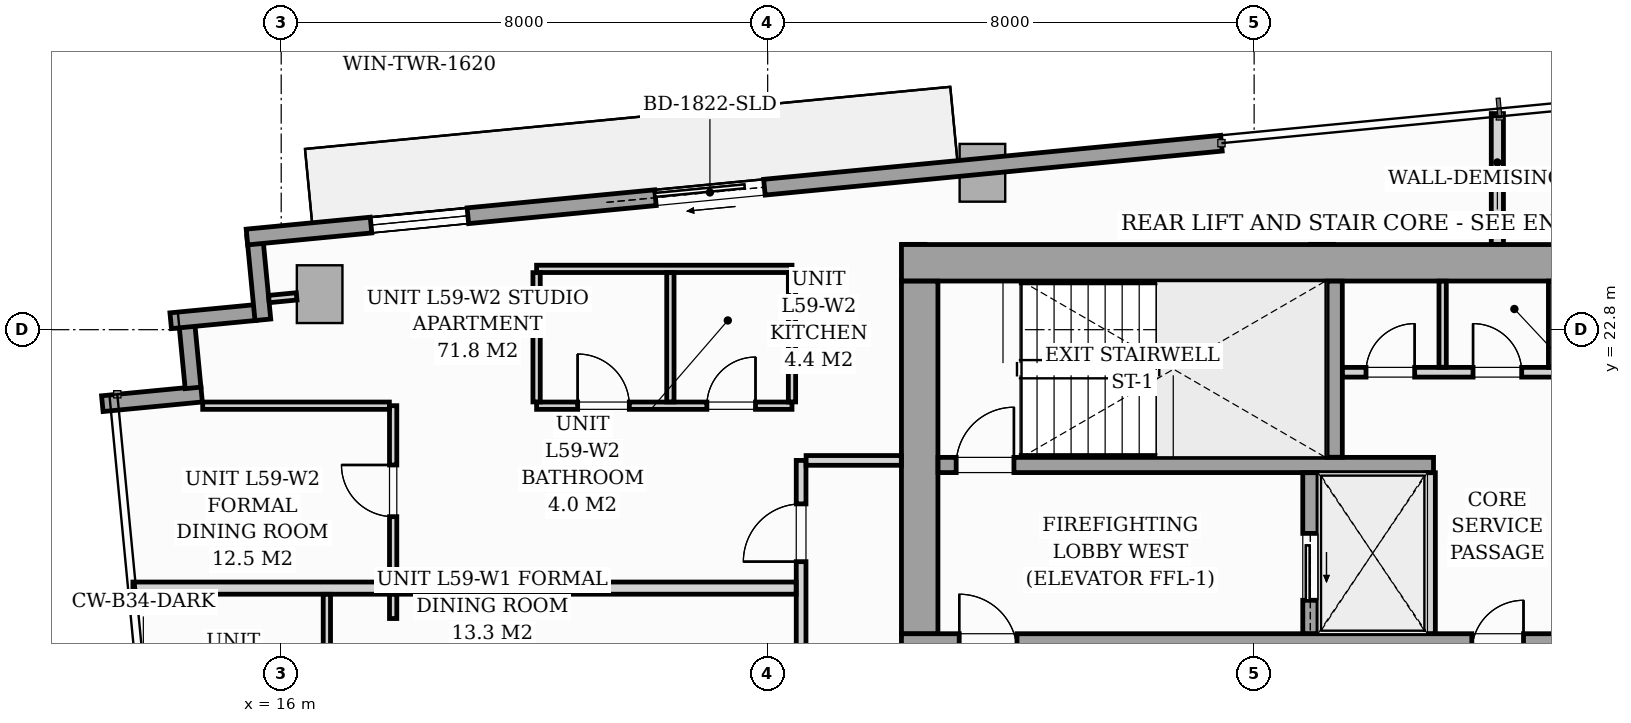
"""IFC4 building model, lengths in metres.
Left out: names, types, materials, properties, quantities, classifications, styles, units other than length and angle.
Written with IfcOpenShell. Run it as: python <this file> out.ifc"""

import sys

from ifc_helpers import new_model, si_unit, direction, frame, frame_2d, origin, origin_2d, place, context, subcontext, project, spatial, rectangle, i_section, extrude, source, transform, mapped, element, fill, save


model = new_model("IFC4")
c1 = context("Model", 3, precision=1e-05, world=origin(), true_north=direction((0.0, 1.0)))
c2 = subcontext(c1, "Body", "Model", "MODEL_VIEW")
j1 = project(units=[si_unit("LENGTHUNIT", "METRE"), si_unit("PLANEANGLEUNIT", "RADIAN")], contexts=[c1])
p1 = place(None, origin())
s1 = spatial("IfcSite", under=j1, at=p1, CompositionType="ELEMENT")
p2 = place(p1, origin())
s2 = spatial("IfcBuilding", under=s1, at=p2, CompositionType="ELEMENT")
p3 = place(p2, frame((0.0, 0.0, 205.0)))
s3 = spatial("IfcBuildingStorey", under=s2, at=p3, CompositionType="ELEMENT", Elevation=205.0)
m1 = source(origin(), c2, "Body", "SweptSolid", [
    extrude(i_section(OverallWidth=0.416, OverallDepth=0.446, WebThickness=0.039, FlangeThickness=0.063, FilletRadius=0.018, at=origin_2d()), origin(), (0.0, 0.0, 1.0), 3.196),
])
for number, where, z_axis, x_axis in (
    (1, (26.4, 24.0, 0.002), (0.0, 0.0, 1.0), (1.0, 0.0, 0.0)),
    (2, (33.12, 24.0, 0.002), (0.0, 0.0, 1.0), (1.0, 0.0, 0.0)),
):
    element("IfcColumn", number, at=place(p3, frame(where, z_axis=z_axis, x_axis=x_axis)), inside=s3, PredefinedType="PILASTER", context=c2, shape_type="MappedRepresentation", body=[
        mapped(m1, transform((0.0, 0.0, 0.0), scale=1.0)),
    ])
m2 = source(origin(), c2, "Body", "SweptSolid", [
    extrude(rectangle(XDim=0.75, YDim=0.95, at=origin_2d()), origin(), (0.0, 0.0, 1.0), 3.196),
])
for number, where, z_axis, x_axis in (
    (3, (16.632, 23.384, 0.002), (0.0, 0.0, 1.0), (0.995, 0.096, 0.0)),
    (4, (27.532, 25.38, 0.002), (0.0, 0.0, 1.0), (0.995, 0.096, 0.0)),
):
    element("IfcColumn", number, at=place(p3, frame(where, z_axis=z_axis, x_axis=x_axis)), inside=s3, PredefinedType="COLUMN", context=c2, shape_type="MappedRepresentation", body=[
        mapped(m2, transform((0.0, 0.0, 0.0), scale=1.0)),
    ])
p4 = place(p3, frame((13.058, 21.583, 0.0), z_axis=(0.0, 0.0, 1.0), x_axis=(0.995394563142, 0.095862733462, 0.0)))
e5 = element("IfcWall", 5, at=p4, inside=s3, PredefinedType="STANDARD", context=c2, shape_type="SweptSolid", body=[
    extrude(rectangle(XDim=1.64, YDim=0.26, at=frame_2d((0.82, 0.0))), origin(), (0.0, 0.0, 1.0), 2.94),
])
p5 = place(p3, frame((14.55, 21.843, 0.0), z_axis=(0.0, 0.0, 1.0), x_axis=(-0.09576095695, 0.995404359607, 0.0)))
e6 = element("IfcWall", 6, at=p5, inside=s3, PredefinedType="STANDARD", context=c2, shape_type="SweptSolid", body=[
    extrude(rectangle(XDim=1.15, YDim=0.26, at=frame_2d((0.575, 0.0))), origin(), (0.0, 0.0, 1.0), 2.94),
])
p6 = place(p3, frame((14.183, 22.947, 0.0), z_axis=(0.0, 0.0, 1.0), x_axis=(0.99540614245, 0.095742423056, 0.0)))
e7 = element("IfcWall", 7, at=p6, inside=s3, PredefinedType="STANDARD", context=c2, shape_type="SweptSolid", body=[
    extrude(rectangle(XDim=1.395, YDim=0.26, at=frame_2d((0.697, 0.0))), origin(), (0.0, 0.0, 1.0), 2.94),
])
p7 = place(p3, frame((15.698, 22.963, 0.0), z_axis=(0.0, 0.0, 1.0), x_axis=(-0.09589913835, 0.995391056452, 0.0)))
e8 = element("IfcWall", 8, at=p7, inside=s3, PredefinedType="STANDARD", context=c2, shape_type="SweptSolid", body=[
    extrude(rectangle(XDim=1.395, YDim=0.26, at=frame_2d((0.698, 0.0))), origin(), (0.0, 0.0, 1.0), 2.94),
])
p8 = place(p3, frame((15.437, 24.324, 0.0), z_axis=(0.0, 0.0, 1.0), x_axis=(0.995395627913, 0.095851676732, 0.0)))
e9 = element("IfcWall", 9, at=p8, inside=s3, PredefinedType="STANDARD", context=c2, shape_type="SweptSolid", body=[
    extrude(rectangle(XDim=16.1, YDim=0.26, at=frame_2d((8.05, 0.0))), origin(), (0.0, 0.0, 1.0), 2.94),
])
p9 = place(p8, frame((6.749, 0.0, 0.0)))
e10 = element("IfcOpeningElement", 10, at=p9, cuts=e9, PredefinedType="OPENING", context=c2, shape_type="SweptSolid", body=[
    extrude(rectangle(XDim=1.8, YDim=2.06, at=frame_2d((0.9, 1.03))), frame((0.0, 0.14, 0.0), z_axis=(0.0, -1.0, 0.0), x_axis=(1.0, 0.0, 0.0)), (0.0, 0.0, 1.0), 0.28),
])
p10 = place(p8, frame((2.05, 0.0, 0.65)))
e11 = element("IfcOpeningElement", 11, at=p10, cuts=e9, PredefinedType="OPENING", context=c2, shape_type="SweptSolid", body=[
    extrude(rectangle(XDim=1.6, YDim=1.5, at=frame_2d((0.8, 0.75))), frame((0.0, 0.14, 0.0), z_axis=(0.0, -1.0, 0.0), x_axis=(1.0, 0.0, 0.0)), (0.0, 0.0, 1.0), 0.28),
])
p11 = place(p3, frame((26.2, 17.5, 0.0), z_axis=(0.0, 0.0, 1.0), x_axis=(1.0, 0.0, 0.0)))
e12 = element("IfcWall", 12, at=p11, inside=s3, PredefinedType="SHEAR", context=c2, shape_type="SweptSolid", body=[
    extrude(rectangle(XDim=19.6, YDim=0.6, at=frame_2d((9.8, 0.0))), origin(), (0.0, 0.0, 1.0), 3.2),
])
p12 = place(p11, frame((0.95, 0.0, 0.0)))
e13 = element("IfcOpeningElement", 13, at=p12, cuts=e12, PredefinedType="OPENING", context=c2, shape_type="SweptSolid", body=[
    extrude(rectangle(XDim=0.95, YDim=2.06, at=frame_2d((0.475, 1.03))), frame((0.0, 0.31, 0.0), z_axis=(0.0, -1.0, 0.0), x_axis=(1.0, 0.0, 0.0)), (0.0, 0.0, 1.0), 0.62),
])
p13 = place(p11, frame((9.38, 0.0, 0.0)))
e14 = element("IfcOpeningElement", 14, at=p13, cuts=e12, PredefinedType="OPENING", context=c2, shape_type="SweptSolid", body=[
    extrude(rectangle(XDim=0.85, YDim=2.0, at=frame_2d((0.425, 1.0))), frame((0.0, 0.31, 0.0), z_axis=(0.0, -1.0, 0.0), x_axis=(1.0, 0.0, 0.0)), (0.0, 0.0, 1.0), 0.62),
])
p14 = place(p11, frame((17.55, 0.0, 0.0)))
e15 = element("IfcOpeningElement", 15, at=p14, cuts=e12, PredefinedType="OPENING", context=c2, shape_type="SweptSolid", body=[
    extrude(rectangle(XDim=0.95, YDim=2.06, at=frame_2d((0.475, 1.03))), frame((0.0, 0.31, 0.0), z_axis=(0.0, -1.0, 0.0), x_axis=(1.0, 0.0, 0.0)), (0.0, 0.0, 1.0), 0.62),
])
p15 = place(p3, frame((26.2, 23.9, 0.0), z_axis=(0.0, 0.0, 1.0), x_axis=(1.0, 0.0, 0.0)))
e16 = element("IfcWall", 16, at=p15, inside=s3, PredefinedType="SHEAR", context=c2, shape_type="SweptSolid", body=[
    extrude(rectangle(XDim=19.6, YDim=0.6, at=frame_2d((9.8, 0.0))), origin(), (0.0, 0.0, 1.0), 3.2),
])
p16 = place(p3, frame((26.5, 17.802, 0.0), z_axis=(0.0, 0.0, 1.0), x_axis=(0.0, 1.0, 0.0)))
e17 = element("IfcWall", 17, at=p16, inside=s3, PredefinedType="SHEAR", context=c2, shape_type="SweptSolid", body=[
    extrude(rectangle(XDim=5.796, YDim=0.6, at=frame_2d((2.898, 0.0))), origin(), (0.0, 0.0, 1.0), 3.2),
])
p17 = place(p3, frame((26.802, 20.575, 0.0), z_axis=(0.0, 0.0, 1.0), x_axis=(1.0, 0.0, 0.0)))
e18 = element("IfcWall", 18, at=p17, inside=s3, PredefinedType="SOLIDWALL", context=c2, shape_type="SweptSolid", body=[
    extrude(rectangle(XDim=8.148, YDim=0.25, at=frame_2d((4.074, 0.0))), origin(), (0.0, 0.0, 1.0), 3.2),
])
p18 = place(p17, frame((0.298, 0.0, 0.0)))
e19 = element("IfcOpeningElement", 19, at=p18, cuts=e18, PredefinedType="OPENING", context=c2, shape_type="SweptSolid", body=[
    extrude(rectangle(XDim=0.95, YDim=2.06, at=frame_2d((0.475, 1.03))), frame((0.0, 0.135, 0.0), z_axis=(0.0, -1.0, 0.0), x_axis=(1.0, 0.0, 0.0)), (0.0, 0.0, 1.0), 0.27),
])
p19 = place(p3, frame((33.325, 20.702, 0.0), z_axis=(0.0, 0.0, 1.0), x_axis=(0.0, 1.0, 0.0)))
e20 = element("IfcWall", 20, at=p19, inside=s3, PredefinedType="SOLIDWALL", context=c2, shape_type="SweptSolid", body=[
    extrude(rectangle(XDim=2.896, YDim=0.25, at=frame_2d((1.448, 0.0))), origin(), (0.0, 0.0, 1.0), 3.2),
])
p20 = place(p3, frame((32.925, 17.802, 0.0), z_axis=(0.0, 0.0, 1.0), x_axis=(0.0, 1.0, 0.0)))
e21 = element("IfcWall", 21, at=p20, inside=s3, PredefinedType="SOLIDWALL", context=c2, shape_type="SweptSolid", body=[
    extrude(rectangle(XDim=2.646, YDim=0.25, at=frame_2d((1.323, 0.0))), origin(), (0.0, 0.0, 1.0), 3.2),
])
p21 = place(p20, frame((0.548, 0.0, 0.0)))
e22 = element("IfcOpeningElement", 22, at=p21, cuts=e21, PredefinedType="OPENING", context=c2, shape_type="SweptSolid", body=[
    extrude(rectangle(XDim=1.1, YDim=2.08, at=frame_2d((0.55, 1.04))), frame((0.0, 0.135, 0.0), z_axis=(0.0, -1.0, 0.0), x_axis=(1.0, 0.0, 0.0)), (0.0, 0.0, 1.0), 0.27),
])
p22 = place(p3, frame((34.9, 17.802, 0.0), z_axis=(0.0, 0.0, 1.0), x_axis=(0.0, 1.0, 0.0)))
e23 = element("IfcWall", 23, at=p22, inside=s3, PredefinedType="PARTITIONING", context=c2, shape_type="SweptSolid", body=[
    extrude(rectangle(XDim=2.646, YDim=0.16, at=frame_2d((1.323, 0.0))), origin(), (0.0, 0.0, 1.0), 2.94),
])
p23 = place(p3, frame((33.452, 22.1, 0.0), z_axis=(0.0, 0.0, 1.0), x_axis=(1.0, 0.0, 0.0)))
e24 = element("IfcWall", 24, at=p23, inside=s3, PredefinedType="PARTITIONING", context=c2, shape_type="SweptSolid", body=[
    extrude(rectangle(XDim=5.096, YDim=0.16, at=frame_2d((2.548, 0.0))), origin(), (0.0, 0.0, 1.0), 2.94),
])
p24 = place(p23, frame((0.388, 0.0, 0.0)))
e25 = element("IfcOpeningElement", 25, at=p24, cuts=e24, PredefinedType="OPENING", context=c2, shape_type="SweptSolid", body=[
    extrude(rectangle(XDim=0.8, YDim=2.05, at=frame_2d((0.4, 1.025))), frame((0.0, 0.09, 0.0), z_axis=(0.0, -1.0, 0.0), x_axis=(1.0, 0.0, 0.0)), (0.0, 0.0, 1.0), 0.18),
])
p25 = place(p23, frame((2.148, 0.0, 0.0)))
e26 = element("IfcOpeningElement", 26, at=p25, cuts=e24, PredefinedType="OPENING", context=c2, shape_type="SweptSolid", body=[
    extrude(rectangle(XDim=0.8, YDim=2.05, at=frame_2d((0.4, 1.025))), frame((0.0, 0.09, 0.0), z_axis=(0.0, -1.0, 0.0), x_axis=(1.0, 0.0, 0.0)), (0.0, 0.0, 1.0), 0.18),
])
p26 = place(p23, frame((3.908, 0.0, 0.0)))
e27 = element("IfcOpeningElement", 27, at=p26, cuts=e24, PredefinedType="OPENING", context=c2, shape_type="SweptSolid", body=[
    extrude(rectangle(XDim=0.8, YDim=2.05, at=frame_2d((0.4, 1.025))), frame((0.0, 0.09, 0.0), z_axis=(0.0, -1.0, 0.0), x_axis=(1.0, 0.0, 0.0)), (0.0, 0.0, 1.0), 0.18),
])
for number, where, z_axis, x_axis in (
    (28, (35.1, 22.182, 0.0), (0.0, 0.0, 1.0), (0.0, 1.0, 0.0)),
    (29, (36.9, 22.182, 0.0), (0.0, 0.0, 1.0), (0.0, 1.0, 0.0)),
):
    element("IfcWall", number, at=place(p3, frame(where, z_axis=z_axis, x_axis=x_axis)), inside=s3, PredefinedType="PARTITIONING", context=c2, shape_type="SweptSolid", body=[
        extrude(rectangle(XDim=1.416, YDim=0.12, at=frame_2d((0.708, 0.0))), origin(), (0.0, 0.0, 1.0), 2.94),
    ])
p27 = place(p3, frame((24.55, 13.362, 0.0), z_axis=(0.0, 0.0, 1.0), x_axis=(0.0, 1.0, 0.0)))
e30 = element("IfcWall", 30, at=p27, inside=s3, PredefinedType="PARTITIONING", context=c2, shape_type="SweptSolid", body=[
    extrude(rectangle(XDim=7.288, YDim=0.16, at=frame_2d((3.644, 0.0))), origin(), (0.0, 0.0, 1.0), 2.94),
])
p28 = place(p27, frame((0.493, 0.0, 0.0)))
e31 = element("IfcOpeningElement", 31, at=p28, cuts=e30, PredefinedType="OPENING", context=c2, shape_type="SweptSolid", body=[
    extrude(rectangle(XDim=0.95, YDim=2.06, at=frame_2d((0.475, 1.03))), frame((0.0, 0.09, 0.0), z_axis=(0.0, -1.0, 0.0), x_axis=(1.0, 0.0, 0.0)), (0.0, 0.0, 1.0), 0.18),
])
p29 = place(p27, frame((5.623, 0.0, 0.0)))
e32 = element("IfcOpeningElement", 32, at=p29, cuts=e30, PredefinedType="OPENING", context=c2, shape_type="SweptSolid", body=[
    extrude(rectangle(XDim=0.95, YDim=2.06, at=frame_2d((0.475, 1.03))), frame((0.0, 0.09, 0.0), z_axis=(0.0, -1.0, 0.0), x_axis=(1.0, 0.0, 0.0)), (0.0, 0.0, 1.0), 0.18),
])
p30 = place(p3, frame((36.0, 24.202, 0.0), z_axis=(0.0, 0.0, 1.0), x_axis=(0.0, 1.0, 0.0)))
e33 = element("IfcWall", 33, at=p30, inside=s3, PredefinedType="PARTITIONING", context=c2, shape_type="SweptSolid", body=[
    extrude(rectangle(XDim=2.152, YDim=0.2, at=frame_2d((1.076, 0.0))), origin(), (0.0, 0.0, 1.0), 2.94),
])
p31 = place(p3, frame((24.632, 20.65, 0.0), z_axis=(0.0, 0.0, 1.0), x_axis=(1.0, 0.0, 0.0)))
e34 = element("IfcWall", 34, at=p31, inside=s3, PredefinedType="PARTITIONING", context=c2, shape_type="SweptSolid", body=[
    extrude(rectangle(XDim=1.566, YDim=0.16, at=frame_2d((0.783, 0.0))), origin(), (0.0, 0.0, 1.0), 2.94),
])
p32 = place(p3, frame((13.561, 18.55, 0.0), z_axis=(0.0, 0.0, 1.0), x_axis=(1.0, 0.0, 0.0)))
e35 = element("IfcWall", 35, at=p32, inside=s3, PredefinedType="PARTITIONING", context=c2, shape_type="SweptSolid", body=[
    extrude(rectangle(XDim=10.907, YDim=0.2, at=frame_2d((5.453, 0.0))), origin(), (0.0, 0.0, 1.0), 2.94),
])
p33 = place(p3, frame((16.751, 7.615, 0.0), z_axis=(0.0, 0.0, 1.0), x_axis=(0.0, 1.0, 0.0)))
e36 = element("IfcWall", 36, at=p33, inside=s3, PredefinedType="PARTITIONING", context=c2, shape_type="SweptSolid", body=[
    extrude(rectangle(XDim=10.833, YDim=0.12, at=frame_2d((5.417, 0.0))), origin(), (0.0, 0.0, 1.0), 2.94),
])
p34 = place(p33, frame((4.849, 0.0, 0.0)))
e37 = element("IfcOpeningElement", 37, at=p34, cuts=e36, PredefinedType="OPENING", context=c2, shape_type="SweptSolid", body=[
    extrude(rectangle(XDim=0.85, YDim=2.05, at=frame_2d((0.425, 1.025))), frame((0.0, 0.07, 0.0), z_axis=(0.0, -1.0, 0.0), x_axis=(1.0, 0.0, 0.0)), (0.0, 0.0, 1.0), 0.14),
])
p35 = place(p3, frame((20.2, 21.55, 0.0), z_axis=(0.0, 0.0, 1.0), x_axis=(1.0, 0.0, 0.0)))
e38 = element("IfcWall", 38, at=p35, inside=s3, PredefinedType="PARTITIONING", context=c2, shape_type="SweptSolid", body=[
    extrude(rectangle(XDim=4.2, YDim=0.12, at=frame_2d((2.1, 0.0))), origin(), (0.0, 0.0, 1.0), 2.94),
])
p36 = place(p35, frame((0.675, 0.0, 0.0)))
e39 = element("IfcOpeningElement", 39, at=p36, cuts=e38, PredefinedType="OPENING", context=c2, shape_type="SweptSolid", body=[
    extrude(rectangle(XDim=0.85, YDim=2.05, at=frame_2d((0.425, 1.025))), frame((0.0, 0.07, 0.0), z_axis=(0.0, -1.0, 0.0), x_axis=(1.0, 0.0, 0.0)), (0.0, 0.0, 1.0), 0.14),
])
p37 = place(p35, frame((2.8, 0.0, 0.0)))
e40 = element("IfcOpeningElement", 40, at=p37, cuts=e38, PredefinedType="OPENING", context=c2, shape_type="SweptSolid", body=[
    extrude(rectangle(XDim=0.8, YDim=2.02, at=frame_2d((0.4, 1.01))), frame((0.0, 0.07, 0.0), z_axis=(0.0, -1.0, 0.0), x_axis=(1.0, 0.0, 0.0)), (0.0, 0.0, 1.0), 0.14),
])
p38 = place(p3, frame((20.2, 23.8, 0.0), z_axis=(0.0, 0.0, 1.0), x_axis=(1.0, 0.0, 0.0)))
e41 = element("IfcWall", 41, at=p38, inside=s3, PredefinedType="PARTITIONING", context=c2, shape_type="SweptSolid", body=[
    extrude(rectangle(XDim=4.2, YDim=0.12, at=frame_2d((2.1, 0.0))), origin(), (0.0, 0.0, 1.0), 2.3),
])
for number, where, z_axis, x_axis in (
    (42, (20.2, 21.612, 0.0), (0.0, 0.0, 1.0), (0.0, 1.0, 0.0)),
    (43, (22.4, 21.612, 0.0), (0.0, 0.0, 1.0), (0.0, 1.0, 0.0)),
    (44, (24.4, 21.612, 0.0), (0.0, 0.0, 1.0), (0.0, 1.0, 0.0)),
):
    element("IfcWall", number, at=place(p3, frame(where, z_axis=z_axis, x_axis=x_axis)), inside=s3, PredefinedType="PARTITIONING", context=c2, shape_type="SweptSolid", body=[
        extrude(rectangle(XDim=2.126, YDim=0.12, at=frame_2d((1.063, 0.0))), origin(), (0.0, 0.0, 1.0), 2.94),
    ])
p39 = place(p3, frame((17.841, 18.05, 0.0), z_axis=(0.0, 0.0, 1.0), x_axis=(0.0, 1.0, 0.0)))
e45 = element("IfcWall", 45, at=p39, inside=s3, PredefinedType="PARTITIONING", context=c2, shape_type="SweptSolid", body=[
    extrude(rectangle(XDim=0.398, YDim=0.12, at=frame_2d((0.199, 0.0))), origin(), (0.0, 0.0, 1.0), 2.94),
])
p40 = place(p3, frame((17.841, 18.652, 0.0), z_axis=(0.0, 0.0, 1.0), x_axis=(0.0, 1.0, 0.0)))
e46 = element("IfcWall", 46, at=p40, inside=s3, PredefinedType="PARTITIONING", context=c2, shape_type="SweptSolid", body=[
    extrude(rectangle(XDim=2.898, YDim=0.12, at=frame_2d((1.449, 0.0))), origin(), (0.0, 0.0, 1.0), 2.94),
])
p41 = place(p40, frame((1.073, 0.0, 0.0)))
e47 = element("IfcOpeningElement", 47, at=p41, cuts=e46, PredefinedType="OPENING", context=c2, shape_type="SweptSolid", body=[
    extrude(rectangle(XDim=0.85, YDim=2.05, at=frame_2d((0.425, 1.025))), frame((0.0, 0.07, 0.0), z_axis=(0.0, -1.0, 0.0), x_axis=(1.0, 0.0, 0.0)), (0.0, 0.0, 1.0), 0.14),
])
p42 = place(p3, frame((14.709, 21.55, 0.0), z_axis=(0.0, 0.0, 1.0), x_axis=(1.0, 0.0, 0.0)))
e48 = element("IfcWall", 48, at=p42, inside=s3, PredefinedType="PARTITIONING", context=c2, shape_type="SweptSolid", body=[
    extrude(rectangle(XDim=3.07, YDim=0.12, at=frame_2d((1.535, 0.0))), origin(), (0.0, 0.0, 1.0), 2.94),
])
p43 = place(p3, frame((16.254, 23.348, 0.0), z_axis=(0.0, 0.0, 1.0), x_axis=(-0.995384576284, -0.09596637586, 0.0)))
e49 = element("IfcWall", 49, at=p43, inside=s3, PredefinedType="PARTITIONING", context=c2, shape_type="SweptSolid", body=[
    extrude(rectangle(XDim=0.458, YDim=0.12, at=frame_2d((0.229, 0.0))), origin(), (0.0, 0.0, 1.0), 2.94),
])
m3 = source(origin(), c2, "Body", "SweptSolid", [
    extrude(rectangle(XDim=1.8, YDim=2.06, at=frame_2d((0.9, 1.03))), frame((0.0, 0.025, 0.0), z_axis=(0.0, -1.0, 0.0), x_axis=(1.0, 0.0, 0.0)), (0.0, 0.0, 1.0), 0.05),
])
p44 = place(p9, origin())
e50 = element("IfcDoor", 50, at=p44, inside=s3, OperationType="SLIDING_TO_LEFT", PredefinedType="DOOR", context=c2, shape_type="MappedRepresentation", body=[
    mapped(m3, transform((0.0, 0.0, 0.0), scale=1.0)),
])
fill(e10, e50)
m4 = source(origin(), c2, "Body", "SweptSolid", [
    extrude(rectangle(XDim=1.6, YDim=1.5, at=frame_2d((0.8, 0.75))), frame((0.0, 0.03, 0.0), z_axis=(0.0, -1.0, 0.0), x_axis=(1.0, 0.0, 0.0)), (0.0, 0.0, 1.0), 0.06),
])
p45 = place(p10, origin())
e51 = element("IfcWindow", 51, at=p45, inside=s3, PartitioningType="SINGLE_PANEL", PredefinedType="WINDOW", context=c2, shape_type="MappedRepresentation", body=[
    mapped(m4, transform((0.0, 0.0, 0.0), scale=1.0)),
])
fill(e11, e51)
m5 = source(origin(), c2, "Body", "SweptSolid", [
    extrude(rectangle(XDim=0.95, YDim=2.06, at=frame_2d((0.475, 1.03))), frame((0.0, 0.025, 0.0), z_axis=(0.0, -1.0, 0.0), x_axis=(1.0, 0.0, 0.0)), (0.0, 0.0, 1.0), 0.05),
])
p46 = place(p18, origin())
e52 = element("IfcDoor", 52, at=p46, inside=s3, OperationType="SINGLE_SWING_RIGHT", PredefinedType="DOOR", context=c2, shape_type="MappedRepresentation", body=[
    mapped(m5, transform((0.0, 0.0, 0.0), scale=1.0)),
])
fill(e19, e52)
m6 = source(origin(), c2, "Body", "SweptSolid", [
    extrude(rectangle(XDim=1.1, YDim=2.08, at=frame_2d((0.55, 1.04))), frame((0.0, 0.025, 0.0), z_axis=(0.0, -1.0, 0.0), x_axis=(1.0, 0.0, 0.0)), (0.0, 0.0, 1.0), 0.05),
])
p47 = place(p21, origin())
e53 = element("IfcDoor", 53, at=p47, inside=s3, OperationType="SLIDING_TO_LEFT", PredefinedType="DOOR", context=c2, shape_type="MappedRepresentation", body=[
    mapped(m6, transform((0.0, 0.0, 0.0), scale=1.0)),
])
fill(e22, e53)
m7 = source(origin(), c2, "Body", "SweptSolid", [
    extrude(rectangle(XDim=0.8, YDim=2.05, at=frame_2d((0.4, 1.025))), frame((0.0, 0.025, 0.0), z_axis=(0.0, -1.0, 0.0), x_axis=(1.0, 0.0, 0.0)), (0.0, 0.0, 1.0), 0.05),
])
p48 = place(p24, origin())
e54 = element("IfcDoor", 54, at=p48, inside=s3, OperationType="SINGLE_SWING_RIGHT", PredefinedType="DOOR", context=c2, shape_type="MappedRepresentation", body=[
    mapped(m7, transform((0.0, 0.0, 0.0), scale=1.0)),
])
fill(e25, e54)
p49 = place(p25, origin())
e55 = element("IfcDoor", 55, at=p49, inside=s3, OperationType="SINGLE_SWING_LEFT", PredefinedType="DOOR", context=c2, shape_type="MappedRepresentation", body=[
    mapped(m7, transform((0.0, 0.0, 0.0), scale=1.0)),
])
fill(e26, e55)
m8 = source(origin(), c2, "Body", "SweptSolid", [
    extrude(rectangle(XDim=0.95, YDim=2.06, at=frame_2d((0.475, 1.03))), frame((0.0, 0.025, 0.0), z_axis=(0.0, -1.0, 0.0), x_axis=(1.0, 0.0, 0.0)), (0.0, 0.0, 1.0), 0.05),
])
p50 = place(p29, origin())
e56 = element("IfcDoor", 56, at=p50, inside=s3, OperationType="SINGLE_SWING_LEFT", PredefinedType="DOOR", context=c2, shape_type="MappedRepresentation", body=[
    mapped(m8, transform((0.0, 0.0, 0.0), scale=1.0)),
])
fill(e32, e56)
m9 = source(origin(), c2, "Body", "SweptSolid", [
    extrude(rectangle(XDim=0.85, YDim=2.05, at=frame_2d((0.425, 1.025))), frame((0.0, 0.025, 0.0), z_axis=(0.0, -1.0, 0.0), x_axis=(1.0, 0.0, 0.0)), (0.0, 0.0, 1.0), 0.05),
])
p51 = place(p41, origin())
e57 = element("IfcDoor", 57, at=p51, inside=s3, OperationType="SINGLE_SWING_RIGHT", PredefinedType="DOOR", context=c2, shape_type="MappedRepresentation", body=[
    mapped(m9, transform((0.0, 0.0, 0.0), scale=1.0)),
])
fill(e47, e57)
p52 = place(p36, origin())
e58 = element("IfcDoor", 58, at=p52, inside=s3, OperationType="SINGLE_SWING_LEFT", PredefinedType="DOOR", context=c2, shape_type="MappedRepresentation", body=[
    mapped(m9, transform((0.0, 0.0, 0.0), scale=1.0)),
])
fill(e39, e58)
m10 = source(origin(), c2, "Body", "SweptSolid", [
    extrude(rectangle(XDim=0.8, YDim=2.02, at=frame_2d((0.4, 1.01))), frame((0.0, 0.025, 0.0), z_axis=(0.0, -1.0, 0.0), x_axis=(1.0, 0.0, 0.0)), (0.0, 0.0, 1.0), 0.05),
])
p53 = place(p37, origin())
e59 = element("IfcDoor", 59, at=p53, inside=s3, OperationType="SINGLE_SWING_RIGHT", PredefinedType="DOOR", context=c2, shape_type="MappedRepresentation", body=[
    mapped(m10, transform((0.0, 0.0, 0.0), scale=1.0)),
])
fill(e40, e59)
save(model, sys.argv[1])
